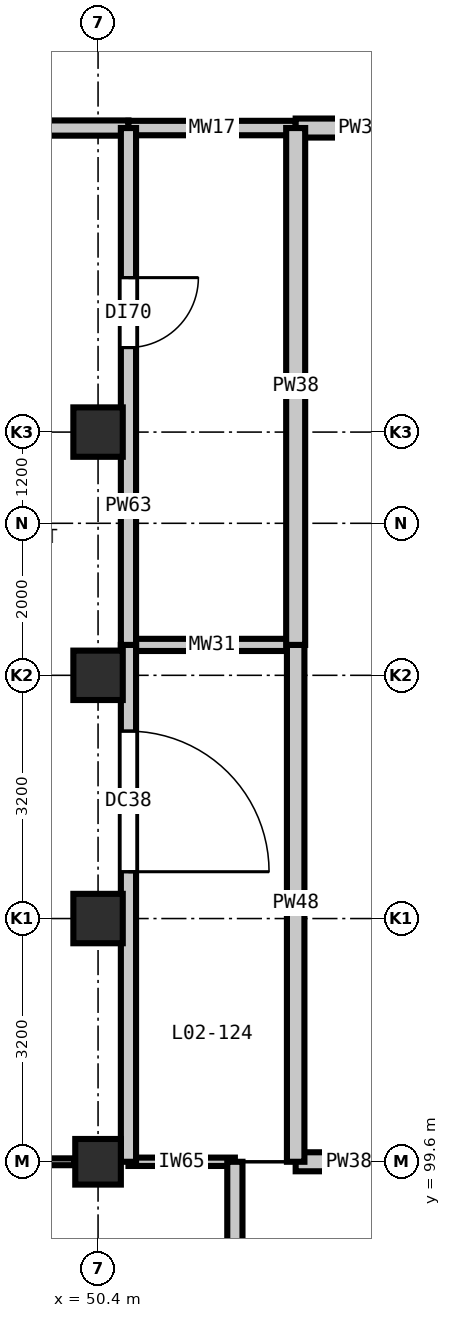
"""IFC4 building model, lengths in metres.
Left out: names, types, materials, properties, quantities, classifications, styles, units other than length and angle.
Written with IfcOpenShell. Run it as: python <this file> out.ifc"""

import sys

from ifc_helpers import new_model, si_unit, direction, frame, frame_2d, origin, origin_2d, place, context, subcontext, project, spatial, rectangle, extrude, element, fill, save


model = new_model("IFC4")
c1 = context("Model", 3, precision=1e-05, world=origin(), true_north=direction((0.0, 1.0)))
c2 = subcontext(c1, "Body", "Model", "MODEL_VIEW")
j1 = project(units=[si_unit("LENGTHUNIT", "METRE"), si_unit("PLANEANGLEUNIT", "RADIAN")], contexts=[c1])
p1 = place(None, origin())
s1 = spatial("IfcSite", under=j1, at=p1, CompositionType="ELEMENT")
p2 = place(p1, origin())
s2 = spatial("IfcBuilding", under=s1, at=p2, CompositionType="ELEMENT")
p3 = place(p2, frame((0.0, 0.0, 10.8)))
s3 = spatial("IfcBuildingStorey", under=s2, at=p3, CompositionType="ELEMENT", Elevation=10.8)
p4 = place(p3, frame((50.4, 99.6, 0.0), z_axis=(0.0, 0.0, 1.0), x_axis=(1.0, 0.0, 0.0)))
e1 = element("IfcColumn", 1, at=p4, inside=s3, PredefinedType="COLUMN", context=c2, shape_type="SweptSolid", body=[
    extrude(rectangle(XDim=0.6, YDim=0.6, at=origin_2d()), origin(), (0.0, 0.0, 1.0), 5.4),
])
for number, where, z_axis, x_axis in (
    (2, (50.4, 102.8, 0.0), (0.0, 0.0, 1.0), (1.0, 0.0, 0.0)),
    (3, (50.4, 106.0, 0.0), (0.0, 0.0, 1.0), (1.0, 0.0, 0.0)),
    (4, (50.4, 109.2, 0.0), (0.0, 0.0, 1.0), (1.0, 0.0, 0.0)),
):
    element("IfcColumn", number, at=place(p3, frame(where, z_axis=z_axis, x_axis=x_axis)), inside=s3, PredefinedType="COLUMN", context=c2, shape_type="SweptSolid", body=[
        extrude(rectangle(XDim=0.65, YDim=0.65, at=origin_2d()), origin(), (0.0, 0.0, 1.0), 5.4),
    ])
p5 = place(p3, frame((47.6, 99.6, 0.0), z_axis=(0.0, 0.0, 1.0), x_axis=(1.0, 0.0, 0.0)))
e5 = element("IfcWall", 5, at=p5, inside=s3, PredefinedType="PARTITIONING", context=c2, shape_type="SweptSolid", body=[
    extrude(rectangle(XDim=2.485, YDim=0.09, at=frame_2d((1.242, 0.0))), origin(), (0.0, 0.0, 1.0), 4.735),
])
p6 = place(p3, frame((50.8, 99.6, 0.0), z_axis=(0.0, 0.0, 1.0), x_axis=(1.0, 0.0, 0.0)))
e6 = element("IfcWall", 6, at=p6, inside=s3, PredefinedType="PARTITIONING", context=c2, shape_type="SweptSolid", body=[
    extrude(rectangle(XDim=1.4, YDim=0.11, at=frame_2d((0.7, 0.0))), origin(), (0.0, 0.0, 1.0), 4.735),
])
p7 = place(p3, frame((53.0, 99.6, 0.0), z_axis=(0.0, 0.0, 1.0), x_axis=(1.0, 0.0, 0.0)))
e7 = element("IfcWall", 7, at=p7, inside=s3, PredefinedType="PARTITIONING", context=c2, shape_type="SweptSolid", body=[
    extrude(rectangle(XDim=1.4, YDim=0.25, at=frame_2d((0.7, 0.0))), origin(), (0.0, 0.0, 1.0), 4.735),
])
p8 = place(p3, frame((50.8, 106.4, 0.0), z_axis=(0.0, 0.0, 1.0), x_axis=(1.0, 0.0, 0.0)))
e8 = element("IfcWall", 8, at=p8, inside=s3, PredefinedType="PLUMBINGWALL", context=c2, shape_type="SweptSolid", body=[
    extrude(rectangle(XDim=2.2, YDim=0.16, at=frame_2d((1.1, 0.0))), origin(), (0.0, 0.0, 1.0), 5.07),
])
p9 = place(p3, frame((46.2, 113.2, 0.0), z_axis=(0.0, 0.0, 1.0), x_axis=(1.0, 0.0, 0.0)))
e9 = element("IfcWall", 9, at=p9, inside=s3, PredefinedType="PARTITIONING", context=c2, shape_type="SweptSolid", body=[
    extrude(rectangle(XDim=4.6, YDim=0.2, at=frame_2d((2.3, 0.0))), origin(), (0.0, 0.0, 1.0), 5.07),
])
p10 = place(p9, frame((1.625, 0.0, 0.0)))
e10 = element("IfcOpeningElement", 10, at=p10, cuts=e9, PredefinedType="OPENING", context=c2, shape_type="SweptSolid", body=[
    extrude(rectangle(XDim=1.35, YDim=2.2, at=frame_2d((0.675, 1.1))), frame((0.0, 0.11, 0.0), z_axis=(0.0, -1.0, 0.0), x_axis=(1.0, 0.0, 0.0)), (0.0, 0.0, 1.0), 0.22),
])
p11 = place(p3, frame((50.8, 113.2, 0.0), z_axis=(0.0, 0.0, 1.0), x_axis=(1.0, 0.0, 0.0)))
e11 = element("IfcWall", 11, at=p11, inside=s3, PredefinedType="PLUMBINGWALL", context=c2, shape_type="SweptSolid", body=[
    extrude(rectangle(XDim=2.2, YDim=0.19, at=frame_2d((1.1, 0.0))), origin(), (0.0, 0.0, 1.0), 5.07),
])
p12 = place(p3, frame((53.0, 113.2, 0.0), z_axis=(0.0, 0.0, 1.0), x_axis=(1.0, 0.0, 0.0)))
e12 = element("IfcWall", 12, at=p12, inside=s3, PredefinedType="PARTITIONING", context=c2, shape_type="SweptSolid", body=[
    extrude(rectangle(XDim=5.4, YDim=0.25, at=frame_2d((2.7, 0.0))), origin(), (0.0, 0.0, 1.0), 5.07),
])
p13 = place(p12, frame((1.975, 0.0, 0.0)))
e13 = element("IfcOpeningElement", 13, at=p13, cuts=e12, PredefinedType="OPENING", context=c2, shape_type="SweptSolid", body=[
    extrude(rectangle(XDim=1.45, YDim=2.25, at=frame_2d((0.725, 1.125))), frame((0.0, 0.135, 0.0), z_axis=(0.0, -1.0, 0.0), x_axis=(1.0, 0.0, 0.0)), (0.0, 0.0, 1.0), 0.27),
])
p14 = place(p3, frame((50.8, 99.6, 0.0), z_axis=(0.0, 0.0, 1.0), x_axis=(0.0, 1.0, 0.0)))
e14 = element("IfcWall", 14, at=p14, inside=s3, PredefinedType="PARTITIONING", context=c2, shape_type="SweptSolid", body=[
    extrude(rectangle(XDim=6.8, YDim=0.2, at=frame_2d((3.4, 0.0))), origin(), (0.0, 0.0, 1.0), 5.07),
])
p15 = place(p14, frame((3.816, 0.0, 0.0)))
e15 = element("IfcOpeningElement", 15, at=p15, cuts=e14, PredefinedType="OPENING", context=c2, shape_type="SweptSolid", body=[
    extrude(rectangle(XDim=1.85, YDim=2.3, at=frame_2d((0.925, 1.15))), frame((0.0, 0.11, 0.0), z_axis=(0.0, -1.0, 0.0), x_axis=(1.0, 0.0, 0.0)), (0.0, 0.0, 1.0), 0.22),
])
p16 = place(p3, frame((50.8, 106.4, 0.0), z_axis=(0.0, 0.0, 1.0), x_axis=(0.0, 1.0, 0.0)))
e16 = element("IfcWall", 16, at=p16, inside=s3, PredefinedType="PARTITIONING", context=c2, shape_type="SweptSolid", body=[
    extrude(rectangle(XDim=6.8, YDim=0.2, at=frame_2d((3.4, 0.0))), origin(), (0.0, 0.0, 1.0), 5.07),
])
p17 = place(p16, frame((3.912, 0.0, 0.0)))
e17 = element("IfcOpeningElement", 17, at=p17, cuts=e16, PredefinedType="OPENING", context=c2, shape_type="SweptSolid", body=[
    extrude(rectangle(XDim=0.92, YDim=2.1, at=frame_2d((0.46, 1.05))), frame((0.0, 0.11, 0.0), z_axis=(0.0, -1.0, 0.0), x_axis=(1.0, 0.0, 0.0)), (0.0, 0.0, 1.0), 0.22),
])
p18 = place(p3, frame((52.2, 94.1, 0.0), z_axis=(0.0, 0.0, 1.0), x_axis=(0.0, 1.0, 0.0)))
e18 = element("IfcWall", 18, at=p18, inside=s3, PredefinedType="PARTITIONING", context=c2, shape_type="SweptSolid", body=[
    extrude(rectangle(XDim=5.5, YDim=0.2, at=frame_2d((2.75, 0.0))), origin(), (0.0, 0.0, 1.0), 5.07),
])
p19 = place(p18, frame((2.075, 0.0, 0.0)))
e19 = element("IfcOpeningElement", 19, at=p19, cuts=e18, PredefinedType="OPENING", context=c2, shape_type="SweptSolid", body=[
    extrude(rectangle(XDim=1.35, YDim=2.2, at=frame_2d((0.675, 1.1))), frame((0.0, 0.11, 0.0), z_axis=(0.0, -1.0, 0.0), x_axis=(1.0, 0.0, 0.0)), (0.0, 0.0, 1.0), 0.22),
])
p20 = place(p3, frame((53.0, 99.6, 0.0), z_axis=(0.0, 0.0, 1.0), x_axis=(0.0, 1.0, 0.0)))
e20 = element("IfcWall", 20, at=p20, inside=s3, PredefinedType="PARTITIONING", context=c2, shape_type="SweptSolid", body=[
    extrude(rectangle(XDim=6.8, YDim=0.23, at=frame_2d((3.4, 0.0))), origin(), (0.0, 0.0, 1.0), 5.07),
])
p21 = place(p3, frame((53.0, 106.4, 0.0), z_axis=(0.0, 0.0, 1.0), x_axis=(0.0, 1.0, 0.0)))
e21 = element("IfcWall", 21, at=p21, inside=s3, PredefinedType="PARTITIONING", context=c2, shape_type="SweptSolid", body=[
    extrude(rectangle(XDim=6.8, YDim=0.25, at=frame_2d((3.4, 0.0))), origin(), (0.0, 0.0, 1.0), 5.07),
])
p22 = place(p15, frame((1.85, 0.0, 0.0), z_axis=(0.0, 0.0, 1.0), x_axis=(-1.0, 0.0, 0.0)))
e22 = element("IfcDoor", 22, at=p22, inside=s3, OperationType="SINGLE_SWING_RIGHT", PredefinedType="DOOR", context=c2, shape_type="SweptSolid", body=[
    extrude(rectangle(XDim=1.85, YDim=2.3, at=frame_2d((0.925, 1.15))), frame((0.0, 0.025, 0.0), z_axis=(0.0, -1.0, 0.0), x_axis=(1.0, 0.0, 0.0)), (0.0, 0.0, 1.0), 0.05),
])
fill(e15, e22)
p23 = place(p17, frame((0.92, 0.0, 0.0), z_axis=(0.0, 0.0, 1.0), x_axis=(-1.0, 0.0, 0.0)))
e23 = element("IfcDoor", 23, at=p23, inside=s3, OperationType="SINGLE_SWING_LEFT", PredefinedType="DOOR", context=c2, shape_type="SweptSolid", body=[
    extrude(rectangle(XDim=0.92, YDim=2.1, at=frame_2d((0.46, 1.05))), frame((0.0, 0.025, 0.0), z_axis=(0.0, -1.0, 0.0), x_axis=(1.0, 0.0, 0.0)), (0.0, 0.0, 1.0), 0.05),
])
fill(e17, e23)
save(model, sys.argv[1])
